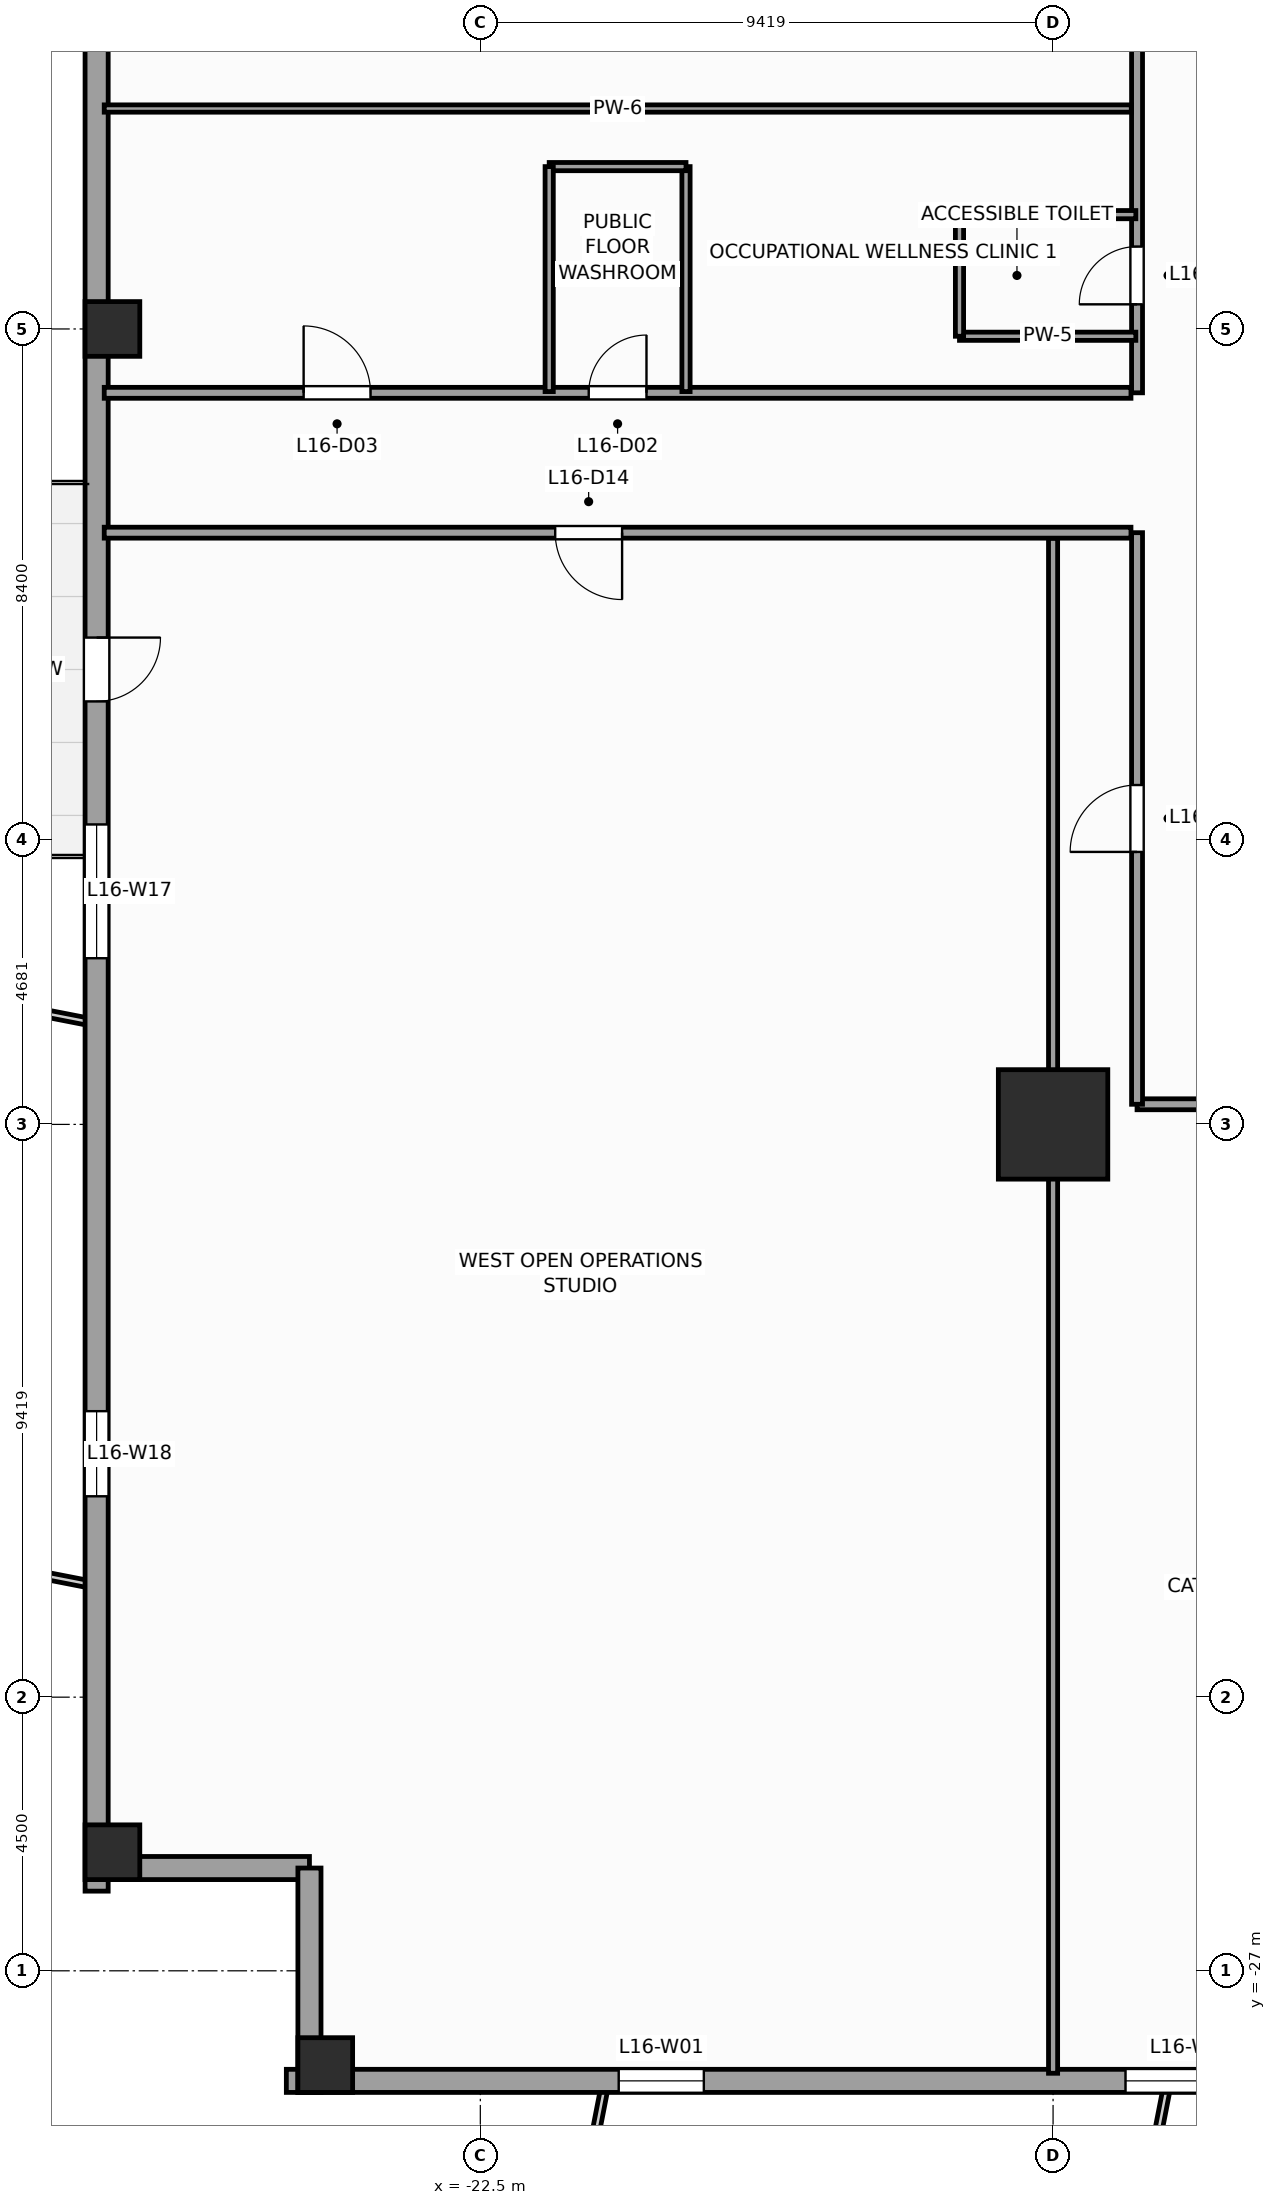
"""IFC4 building model, lengths in metres.
Left out: names, types, materials, properties, quantities, classifications, styles, units other than length and angle.
Written with IfcOpenShell. Run it as: python <this file> out.ifc"""

import sys

from ifc_helpers import new_model, si_unit, direction, frame, frame_2d, origin, origin_2d, place, context, subcontext, project, spatial, rectangle, extrude, source, transform, mapped, element, fill, save


model = new_model("IFC4")
c1 = context("Model", 3, precision=1e-05, world=origin(), true_north=direction((0.0, 1.0)))
c2 = subcontext(c1, "Body", "Model", "MODEL_VIEW")
j1 = project(units=[si_unit("LENGTHUNIT", "METRE"), si_unit("PLANEANGLEUNIT", "RADIAN")], contexts=[c1])
p1 = place(None, origin())
s1 = spatial("IfcSite", under=j1, at=p1, CompositionType="ELEMENT")
p2 = place(p1, origin())
s2 = spatial("IfcBuilding", under=s1, at=p2, CompositionType="ELEMENT")
p3 = place(p2, frame((0.0, 0.0, 70.0)))
s3 = spatial("IfcBuildingStorey", under=s2, at=p3, CompositionType="ELEMENT", Elevation=70.0)
m1 = source(origin(), c2, "Body", "SweptSolid", [
    extrude(rectangle(XDim=1.8, YDim=1.8, at=origin_2d()), origin(), (0.0, 0.0, 1.0), 4.0),
])
p4 = place(p3, frame((-13.081, -13.081, 0.0), z_axis=(0.0, 0.0, 1.0), x_axis=(1.0, 0.0, 0.0)))
e1 = element("IfcColumn", 1, at=p4, inside=s3, PredefinedType="COLUMN", context=c2, shape_type="MappedRepresentation", body=[
    mapped(m1, transform((0.0, 0.0, 0.0), scale=1.0)),
])
m2 = source(origin(), c2, "Body", "SweptSolid", [
    extrude(rectangle(XDim=0.9, YDim=0.9, at=origin_2d()), origin(), (0.0, 0.0, 1.0), 4.0),
])
for number, where, z_axis, x_axis in (
    (2, (-25.05, -28.55, 0.0), (0.0, 0.0, 1.0), (1.0, 0.0, 0.0)),
    (3, (-28.55, 0.0, 0.0), (0.0, 0.0, 1.0), (1.0, 0.0, 0.0)),
    (4, (-28.55, -25.05, 0.0), (0.0, 0.0, 1.0), (1.0, 0.0, 0.0)),
):
    element("IfcColumn", number, at=place(p3, frame(where, z_axis=z_axis, x_axis=x_axis)), inside=s3, PredefinedType="COLUMN", context=c2, shape_type="MappedRepresentation", body=[
        mapped(m2, transform((0.0, 0.0, 0.0), scale=1.0)),
    ])
p5 = place(p3, frame((-25.69, -28.81, 0.0), z_axis=(0.0, 0.0, 1.0), x_axis=(1.0, 0.0, 0.0)))
e5 = element("IfcWall", 5, at=p5, inside=s3, PredefinedType="STANDARD", context=c2, shape_type="SweptSolid", body=[
    extrude(rectangle(XDim=51.38, YDim=0.38, at=frame_2d((25.69, 0.0))), origin(), (0.0, 0.0, 1.0), 3.12),
])
p6 = place(p5, frame((5.466, 0.0, 0.49)))
e6 = element("IfcOpeningElement", 6, at=p6, cuts=e5, PredefinedType="OPENING", context=c2, shape_type="SweptSolid", body=[
    extrude(rectangle(XDim=1.4, YDim=2.4, at=frame_2d((0.7, 1.2))), frame((0.0, 0.2, 0.0), z_axis=(0.0, -1.0, 0.0), x_axis=(1.0, 0.0, 0.0)), (0.0, 0.0, 1.0), 0.4),
])
p7 = place(p5, frame((13.8, 0.0, 0.49)))
e7 = element("IfcOpeningElement", 7, at=p7, cuts=e5, PredefinedType="OPENING", context=c2, shape_type="SweptSolid", body=[
    extrude(rectangle(XDim=2.2, YDim=2.4, at=frame_2d((1.1, 1.2))), frame((0.0, 0.2, 0.0), z_axis=(0.0, -1.0, 0.0), x_axis=(1.0, 0.0, 0.0)), (0.0, 0.0, 1.0), 0.4),
])
p8 = place(p5, frame((22.062, 0.0, 0.49)))
e8 = element("IfcOpeningElement", 8, at=p8, cuts=e5, PredefinedType="OPENING", context=c2, shape_type="SweptSolid", body=[
    extrude(rectangle(XDim=2.2, YDim=2.4, at=frame_2d((1.1, 1.2))), frame((0.0, 0.2, 0.0), z_axis=(0.0, -1.0, 0.0), x_axis=(1.0, 0.0, 0.0)), (0.0, 0.0, 1.0), 0.4),
])
p9 = place(p5, frame((35.338, 0.0, 0.49)))
e9 = element("IfcOpeningElement", 9, at=p9, cuts=e5, PredefinedType="OPENING", context=c2, shape_type="SweptSolid", body=[
    extrude(rectangle(XDim=2.2, YDim=2.4, at=frame_2d((1.1, 1.2))), frame((0.0, 0.2, 0.0), z_axis=(0.0, -1.0, 0.0), x_axis=(1.0, 0.0, 0.0)), (0.0, 0.0, 1.0), 0.4),
])
p10 = place(p5, frame((43.487, 0.0, 0.49)))
e10 = element("IfcOpeningElement", 10, at=p10, cuts=e5, PredefinedType="OPENING", context=c2, shape_type="SweptSolid", body=[
    extrude(rectangle(XDim=1.4, YDim=2.4, at=frame_2d((0.7, 1.2))), frame((0.0, 0.2, 0.0), z_axis=(0.0, -1.0, 0.0), x_axis=(1.0, 0.0, 0.0)), (0.0, 0.0, 1.0), 0.4),
])
p11 = place(p3, frame((-28.81, 25.69, 0.0), z_axis=(0.0, 0.0, 1.0), x_axis=(0.0, -1.0, 0.0)))
e11 = element("IfcWall", 11, at=p11, inside=s3, PredefinedType="STANDARD", context=c2, shape_type="SweptSolid", body=[
    extrude(rectangle(XDim=51.38, YDim=0.38, at=frame_2d((25.69, 0.0))), origin(), (0.0, 0.0, 1.0), 3.12),
])
p12 = place(p11, frame((30.765, 0.0, 0.0)))
e12 = element("IfcOpeningElement", 12, at=p12, cuts=e11, PredefinedType="OPENING", context=c2, shape_type="SweptSolid", body=[
    extrude(rectangle(XDim=1.05, YDim=2.25, at=frame_2d((0.525, 1.125))), frame((0.0, 0.2, 0.0), z_axis=(0.0, -1.0, 0.0), x_axis=(1.0, 0.0, 0.0)), (0.0, 0.0, 1.0), 0.4),
])
p13 = place(p11, frame((5.466, 0.0, 0.49)))
e13 = element("IfcOpeningElement", 13, at=p13, cuts=e11, PredefinedType="OPENING", context=c2, shape_type="SweptSolid", body=[
    extrude(rectangle(XDim=1.4, YDim=2.4, at=frame_2d((0.7, 1.2))), frame((0.0, 0.2, 0.0), z_axis=(0.0, -1.0, 0.0), x_axis=(1.0, 0.0, 0.0)), (0.0, 0.0, 1.0), 0.4),
])
p14 = place(p11, frame((13.8, 0.0, 0.49)))
e14 = element("IfcOpeningElement", 14, at=p14, cuts=e11, PredefinedType="OPENING", context=c2, shape_type="SweptSolid", body=[
    extrude(rectangle(XDim=2.2, YDim=2.4, at=frame_2d((1.1, 1.2))), frame((0.0, 0.2, 0.0), z_axis=(0.0, -1.0, 0.0), x_axis=(1.0, 0.0, 0.0)), (0.0, 0.0, 1.0), 0.4),
])
p15 = place(p11, frame((33.838, 0.0, 0.49)))
e15 = element("IfcOpeningElement", 15, at=p15, cuts=e11, PredefinedType="OPENING", context=c2, shape_type="SweptSolid", body=[
    extrude(rectangle(XDim=2.2, YDim=2.4, at=frame_2d((1.1, 1.2))), frame((0.0, 0.2, 0.0), z_axis=(0.0, -1.0, 0.0), x_axis=(1.0, 0.0, 0.0)), (0.0, 0.0, 1.0), 0.4),
])
p16 = place(p11, frame((43.487, 0.0, 0.49)))
e16 = element("IfcOpeningElement", 16, at=p16, cuts=e11, PredefinedType="OPENING", context=c2, shape_type="SweptSolid", body=[
    extrude(rectangle(XDim=1.4, YDim=2.4, at=frame_2d((0.7, 1.2))), frame((0.0, 0.2, 0.0), z_axis=(0.0, -1.0, 0.0), x_axis=(1.0, 0.0, 0.0)), (0.0, 0.0, 1.0), 0.4),
])
p17 = place(p3, frame((-28.81, -25.31, 0.0), z_axis=(0.0, 0.0, 1.0), x_axis=(1.0, 0.0, 0.0)))
e17 = element("IfcWall", 17, at=p17, inside=s3, PredefinedType="STANDARD", context=c2, shape_type="SweptSolid", body=[
    extrude(rectangle(XDim=3.5, YDim=0.38, at=frame_2d((1.75, 0.0))), origin(), (0.0, 0.0, 1.0), 3.72),
])
p18 = place(p3, frame((-25.31, -25.31, 0.0), z_axis=(0.0, 0.0, 1.0), x_axis=(0.0, -1.0, 0.0)))
e18 = element("IfcWall", 18, at=p18, inside=s3, PredefinedType="STANDARD", context=c2, shape_type="SweptSolid", body=[
    extrude(rectangle(XDim=3.69, YDim=0.38, at=frame_2d((1.845, 0.0))), origin(), (0.0, 0.0, 1.0), 3.72),
])
p19 = place(p3, frame((-11.7, -12.75, 0.0), z_axis=(0.0, 0.0, 1.0), x_axis=(1.0, 0.0, 0.0)))
e19 = element("IfcWall", 19, at=p19, inside=s3, PredefinedType="PARTITIONING", context=c2, shape_type="SweptSolid", body=[
    extrude(rectangle(XDim=12.75, YDim=0.18, at=frame_2d((6.375, 0.0))), origin(), (0.0, 0.0, 1.0), 3.72),
])
p20 = place(p3, frame((-11.7, -12.75, 0.0), z_axis=(0.0, 0.0, 1.0), x_axis=(0.0, 1.0, 0.0)))
e20 = element("IfcWall", 20, at=p20, inside=s3, PredefinedType="PARTITIONING", context=c2, shape_type="SweptSolid", body=[
    extrude(rectangle(XDim=9.4, YDim=0.18, at=frame_2d((4.7, 0.0))), origin(), (0.0, 0.0, 1.0), 3.72),
])
p21 = place(p20, frame((4.15, 0.0, 0.0)))
e21 = element("IfcOpeningElement", 21, at=p21, cuts=e20, PredefinedType="OPENING", context=c2, shape_type="SweptSolid", body=[
    extrude(rectangle(XDim=1.1, YDim=2.2, at=frame_2d((0.55, 1.1))), frame((0.0, 0.1, 0.0), z_axis=(0.0, -1.0, 0.0), x_axis=(1.0, 0.0, 0.0)), (0.0, 0.0, 1.0), 0.2),
])
p22 = place(p3, frame((-11.7, -1.05, 0.0), z_axis=(0.0, 0.0, 1.0), x_axis=(0.0, 1.0, 0.0)))
e22 = element("IfcWall", 22, at=p22, inside=s3, PredefinedType="PARTITIONING", context=c2, shape_type="SweptSolid", body=[
    extrude(rectangle(XDim=11.65, YDim=0.18, at=frame_2d((5.825, 0.0))), origin(), (0.0, 0.0, 1.0), 3.72),
])
p23 = place(p22, frame((1.455, 0.0, 0.0)))
e23 = element("IfcOpeningElement", 23, at=p23, cuts=e22, PredefinedType="OPENING", context=c2, shape_type="SweptSolid", body=[
    extrude(rectangle(XDim=0.95, YDim=2.1, at=frame_2d((0.475, 1.05))), frame((0.0, 0.1, 0.0), z_axis=(0.0, -1.0, 0.0), x_axis=(1.0, 0.0, 0.0)), (0.0, 0.0, 1.0), 0.2),
])
p24 = place(p22, frame((6.462, 0.0, 0.0)))
e24 = element("IfcOpeningElement", 24, at=p24, cuts=e22, PredefinedType="OPENING", context=c2, shape_type="SweptSolid", body=[
    extrude(rectangle(XDim=1.1, YDim=2.2, at=frame_2d((0.55, 1.1))), frame((0.0, 0.1, 0.0), z_axis=(0.0, -1.0, 0.0), x_axis=(1.0, 0.0, 0.0)), (0.0, 0.0, 1.0), 0.2),
])
p25 = place(p3, frame((-28.685, -3.35, 0.0), z_axis=(0.0, 0.0, 1.0), x_axis=(1.0, 0.0, 0.0)))
e25 = element("IfcWall", 25, at=p25, inside=s3, PredefinedType="PARTITIONING", context=c2, shape_type="SweptSolid", body=[
    extrude(rectangle(XDim=16.885, YDim=0.18, at=frame_2d((8.442, 0.0))), origin(), (0.0, 0.0, 1.0), 3.72),
])
p26 = place(p25, frame((7.417, 0.0, 0.0)))
e26 = element("IfcOpeningElement", 26, at=p26, cuts=e25, PredefinedType="OPENING", context=c2, shape_type="SweptSolid", body=[
    extrude(rectangle(XDim=1.1, YDim=2.2, at=frame_2d((0.55, 1.1))), frame((0.0, 0.1, 0.0), z_axis=(0.0, -1.0, 0.0), x_axis=(1.0, 0.0, 0.0)), (0.0, 0.0, 1.0), 0.2),
])
p27 = place(p3, frame((-28.685, -1.05, 0.0), z_axis=(0.0, 0.0, 1.0), x_axis=(1.0, 0.0, 0.0)))
e27 = element("IfcWall", 27, at=p27, inside=s3, PredefinedType="PARTITIONING", context=c2, shape_type="SweptSolid", body=[
    extrude(rectangle(XDim=16.885, YDim=0.18, at=frame_2d((8.442, 0.0))), origin(), (0.0, 0.0, 1.0), 3.72),
])
p28 = place(p27, frame((7.968, 0.0, 0.0)))
e28 = element("IfcOpeningElement", 28, at=p28, cuts=e27, PredefinedType="OPENING", context=c2, shape_type="SweptSolid", body=[
    extrude(rectangle(XDim=0.95, YDim=2.1, at=frame_2d((0.475, 1.05))), frame((0.0, 0.1, 0.0), z_axis=(0.0, -1.0, 0.0), x_axis=(1.0, 0.0, 0.0)), (0.0, 0.0, 1.0), 0.2),
])
p29 = place(p27, frame((3.279, 0.0, 0.0)))
e29 = element("IfcOpeningElement", 29, at=p29, cuts=e27, PredefinedType="OPENING", context=c2, shape_type="SweptSolid", body=[
    extrude(rectangle(XDim=1.1, YDim=2.2, at=frame_2d((0.55, 1.1))), frame((0.0, 0.1, 0.0), z_axis=(0.0, -1.0, 0.0), x_axis=(1.0, 0.0, 0.0)), (0.0, 0.0, 1.0), 0.2),
])
p30 = place(p3, frame((-28.685, 3.625, 0.0), z_axis=(0.0, 0.0, 1.0), x_axis=(1.0, 0.0, 0.0)))
e30 = element("IfcWall", 30, at=p30, inside=s3, PredefinedType="PARTITIONING", context=c2, shape_type="SweptSolid", body=[
    extrude(rectangle(XDim=16.89, YDim=0.12, at=frame_2d((8.445, 0.0))), origin(), (0.0, 0.0, 1.0), 3.72),
])
p31 = place(p3, frame((-13.081, -28.685, 0.0), z_axis=(0.0, 0.0, 1.0), x_axis=(0.0, 1.0, 0.0)))
e31 = element("IfcWall", 31, at=p31, inside=s3, PredefinedType="PARTITIONING", context=c2, shape_type="SweptSolid", body=[
    extrude(rectangle(XDim=25.24, YDim=0.15, at=frame_2d((12.62, 0.0))), origin(), (0.0, 0.0, 1.0), 2.712),
])
for number, where, z_axis, x_axis in (
    (32, (-14.62, -0.12, 0.0), (0.0, 0.0, 1.0), (1.0, 0.0, 0.0)),
    (33, (-14.62, 1.88, 0.0), (0.0, 0.0, 1.0), (1.0, 0.0, 0.0)),
):
    element("IfcWall", number, at=place(p3, frame(where, z_axis=z_axis, x_axis=x_axis)), inside=s3, PredefinedType="PARTITIONING", context=c2, shape_type="SweptSolid", body=[
        extrude(rectangle(XDim=2.9, YDim=0.135, at=frame_2d((1.45, 0.0))), origin(), (0.0, 0.0, 1.0), 3.72),
    ])
p32 = place(p3, frame((-14.62, -0.12, 0.0), z_axis=(0.0, 0.0, 1.0), x_axis=(0.0, 1.0, 0.0)))
e34 = element("IfcWall", 34, at=p32, inside=s3, PredefinedType="PARTITIONING", context=c2, shape_type="SweptSolid", body=[
    extrude(rectangle(XDim=2.0, YDim=0.135, at=frame_2d((1.0, 0.0))), origin(), (0.0, 0.0, 1.0), 3.72),
])
p33 = place(p3, frame((-19.117, -1.03, 0.0), z_axis=(0.0, 0.0, 1.0), x_axis=(0.0, 1.0, 0.0)))
e35 = element("IfcWall", 35, at=p33, inside=s3, PredefinedType="PARTITIONING", context=c2, shape_type="SweptSolid", body=[
    extrude(rectangle(XDim=3.7, YDim=0.135, at=frame_2d((1.85, 0.0))), origin(), (0.0, 0.0, 1.0), 3.72),
])
p34 = place(p3, frame((-21.367, 2.67, 0.0), z_axis=(0.0, 0.0, 1.0), x_axis=(1.0, 0.0, 0.0)))
e36 = element("IfcWall", 36, at=p34, inside=s3, PredefinedType="PARTITIONING", context=c2, shape_type="SweptSolid", body=[
    extrude(rectangle(XDim=2.25, YDim=0.135, at=frame_2d((1.125, 0.0))), origin(), (0.0, 0.0, 1.0), 3.72),
])
p35 = place(p3, frame((-21.367, -1.03, 0.0), z_axis=(0.0, 0.0, 1.0), x_axis=(0.0, 1.0, 0.0)))
e37 = element("IfcWall", 37, at=p35, inside=s3, PredefinedType="PARTITIONING", context=c2, shape_type="SweptSolid", body=[
    extrude(rectangle(XDim=3.7, YDim=0.135, at=frame_2d((1.85, 0.0))), origin(), (0.0, 0.0, 1.0), 3.22),
])
m3 = source(origin(), c2, "Body", "SweptSolid", [
    extrude(rectangle(XDim=1.4, YDim=2.4, at=frame_2d((0.7, 1.2))), frame((0.0, 0.03, 0.0), z_axis=(0.0, -1.0, 0.0), x_axis=(1.0, 0.0, 0.0)), (0.0, 0.0, 1.0), 0.06),
])
p36 = place(p6, origin())
e38 = element("IfcWindow", 38, at=p36, inside=s3, PartitioningType="SINGLE_PANEL", PredefinedType="WINDOW", context=c2, shape_type="MappedRepresentation", body=[
    mapped(m3, transform((0.0, 0.0, 0.0), scale=1.0)),
])
fill(e6, e38)
m4 = source(origin(), c2, "Body", "SweptSolid", [
    extrude(rectangle(XDim=2.2, YDim=2.4, at=frame_2d((1.1, 1.2))), frame((0.0, 0.03, 0.0), z_axis=(0.0, -1.0, 0.0), x_axis=(1.0, 0.0, 0.0)), (0.0, 0.0, 1.0), 0.06),
])
p37 = place(p7, origin())
e39 = element("IfcWindow", 39, at=p37, inside=s3, PartitioningType="SINGLE_PANEL", PredefinedType="WINDOW", context=c2, shape_type="MappedRepresentation", body=[
    mapped(m4, transform((0.0, 0.0, 0.0), scale=1.0)),
])
fill(e7, e39)
m5 = source(origin(), c2, "Body", "SweptSolid", [
    extrude(rectangle(XDim=1.05, YDim=2.25, at=frame_2d((0.525, 1.125))), frame((0.0, 0.025, 0.0), z_axis=(0.0, -1.0, 0.0), x_axis=(1.0, 0.0, 0.0)), (0.0, 0.0, 1.0), 0.05),
])
p38 = place(p12, origin())
e40 = element("IfcDoor", 40, at=p38, inside=s3, OperationType="SINGLE_SWING_LEFT", PredefinedType="DOOR", context=c2, shape_type="MappedRepresentation", body=[
    mapped(m5, transform((0.0, 0.0, 0.0), scale=1.0)),
])
fill(e12, e40)
p39 = place(p15, origin())
e41 = element("IfcWindow", 41, at=p39, inside=s3, PartitioningType="SINGLE_PANEL", PredefinedType="WINDOW", context=c2, shape_type="MappedRepresentation", body=[
    mapped(m4, transform((0.0, 0.0, 0.0), scale=1.0)),
])
fill(e15, e41)
p40 = place(p16, origin())
e42 = element("IfcWindow", 42, at=p40, inside=s3, PartitioningType="SINGLE_PANEL", PredefinedType="WINDOW", context=c2, shape_type="MappedRepresentation", body=[
    mapped(m3, transform((0.0, 0.0, 0.0), scale=1.0)),
])
fill(e16, e42)
m6 = source(origin(), c2, "Body", "SweptSolid", [
    extrude(rectangle(XDim=0.95, YDim=2.1, at=frame_2d((0.475, 1.05))), frame((0.0, 0.025, 0.0), z_axis=(0.0, -1.0, 0.0), x_axis=(1.0, 0.0, 0.0)), (0.0, 0.0, 1.0), 0.05),
])
p41 = place(p23, origin())
e43 = element("IfcDoor", 43, at=p41, inside=s3, OperationType="SINGLE_SWING_LEFT", PredefinedType="DOOR", context=c2, shape_type="MappedRepresentation", body=[
    mapped(m6, transform((0.0, 0.0, 0.0), scale=1.0)),
])
fill(e23, e43)
p42 = place(p28, origin())
e44 = element("IfcDoor", 44, at=p42, inside=s3, OperationType="SINGLE_SWING_RIGHT", PredefinedType="DOOR", context=c2, shape_type="MappedRepresentation", body=[
    mapped(m6, transform((0.0, 0.0, 0.0), scale=1.0)),
])
fill(e28, e44)
m7 = source(origin(), c2, "Body", "SweptSolid", [
    extrude(rectangle(XDim=1.1, YDim=2.2, at=frame_2d((0.55, 1.1))), frame((0.0, 0.025, 0.0), z_axis=(0.0, -1.0, 0.0), x_axis=(1.0, 0.0, 0.0)), (0.0, 0.0, 1.0), 0.05),
])
p43 = place(p29, origin())
e45 = element("IfcDoor", 45, at=p43, inside=s3, OperationType="SINGLE_SWING_LEFT", PredefinedType="DOOR", context=c2, shape_type="MappedRepresentation", body=[
    mapped(m7, transform((0.0, 0.0, 0.0), scale=1.0)),
])
fill(e29, e45)
p44 = place(p26, frame((1.1, 0.0, 0.0), z_axis=(0.0, 0.0, 1.0), x_axis=(-1.0, 0.0, 0.0)))
e46 = element("IfcDoor", 46, at=p44, inside=s3, OperationType="SINGLE_SWING_RIGHT", PredefinedType="DOOR", context=c2, shape_type="MappedRepresentation", body=[
    mapped(m7, transform((0.0, 0.0, 0.0), scale=1.0)),
])
fill(e26, e46)
p45 = place(p21, origin())
e47 = element("IfcDoor", 47, at=p45, inside=s3, OperationType="SINGLE_SWING_LEFT", PredefinedType="DOOR", context=c2, shape_type="MappedRepresentation", body=[
    mapped(m7, transform((0.0, 0.0, 0.0), scale=1.0)),
])
fill(e21, e47)
save(model, sys.argv[1])
